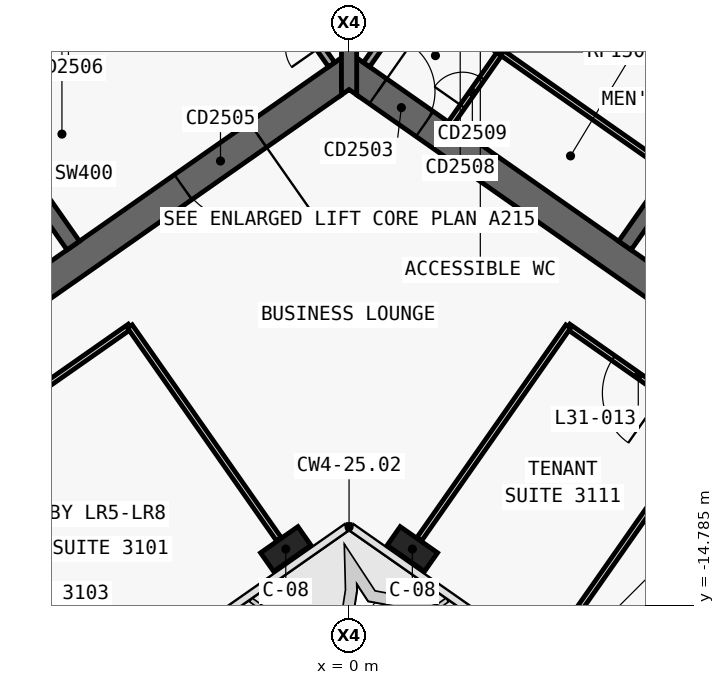
"""IFC4 building model, lengths in metres.
Left out: names, types, materials, properties, quantities, classifications, styles, units other than length and angle.
Written with IfcOpenShell. Run it as: python <this file> out.ifc"""

import sys

from ifc_helpers import new_model, si_unit, direction, frame, frame_2d, origin, origin_2d, place, context, subcontext, project, spatial, polyline, rectangle, outline, extrude, element, fill, save


model = new_model("IFC4")
c1 = context("Model", 3, precision=1e-05, world=origin(), true_north=direction((0.0, 1.0)))
c2 = subcontext(c1, "Body", "Model", "MODEL_VIEW")
j1 = project(units=[si_unit("LENGTHUNIT", "METRE"), si_unit("PLANEANGLEUNIT", "RADIAN")], contexts=[c1])
p1 = place(None, origin())
s1 = spatial("IfcSite", under=j1, at=p1, CompositionType="ELEMENT")
p2 = place(p1, origin())
s2 = spatial("IfcBuilding", under=s1, at=p2, CompositionType="ELEMENT")
p3 = place(p2, frame((0.0, 0.0, 139.8)))
s3 = spatial("IfcBuildingStorey", under=s2, at=p3, CompositionType="ELEMENT", Elevation=139.8)
p4 = place(p3, frame((0.029, 11.984, 0.0), z_axis=(0.0, 0.0, 1.0), x_axis=(-0.819151382952, -0.573577380837, 0.0)))
e1 = element("IfcWall", 1, at=p4, inside=s3, PredefinedType="SHEAR", context=c2, shape_type="SweptSolid", body=[
    extrude(outline(polyline([(33.898, 0.4), (0.56, 0.4), (-0.0, -0.4), (33.898, -0.4), (33.898, 0.4)])), origin(), (0.0, 0.0, 1.0), 3.9),
])
p5 = place(p3, frame((0.029, -0.712, 0.0), z_axis=(0.0, 0.0, 1.0), x_axis=(-0.819151758019, -0.573576845187, 0.0)))
e2 = element("IfcWall", 2, at=p5, inside=s3, PredefinedType="SHEAR", context=c2, shape_type="SweptSolid", body=[
    extrude(outline(polyline([(26.616, 0.4), (0.56, 0.4), (-0.0, -0.4), (26.616, -0.4), (26.616, 0.4)])), origin(), (0.0, 0.0, 1.0), 3.9),
])
p6 = place(p5, frame((2.966, 0.0, 0.0)))
e3 = element("IfcOpeningElement", 3, at=p6, cuts=e2, PredefinedType="OPENING", context=c2, shape_type="SweptSolid", body=[
    extrude(rectangle(XDim=2.4, YDim=2.1, at=frame_2d((1.2, 1.05))), frame((0.0, 0.41, 0.0), z_axis=(0.0, -1.0, 0.0), x_axis=(1.0, 0.0, 0.0)), (0.0, 0.0, 1.0), 0.82),
])
p7 = place(p5, frame((11.916, 0.0, 0.0)))
e4 = element("IfcOpeningElement", 4, at=p7, cuts=e2, PredefinedType="OPENING", context=c2, shape_type="SweptSolid", body=[
    extrude(rectangle(XDim=2.4, YDim=2.1, at=frame_2d((1.2, 1.05))), frame((0.0, 0.41, 0.0), z_axis=(0.0, -1.0, 0.0), x_axis=(1.0, 0.0, 0.0)), (0.0, 0.0, 1.0), 0.82),
])
p8 = place(p3, frame((-7.258, -5.326, 0.0), z_axis=(0.0, 0.0, 1.0), x_axis=(-0.573540709186, 0.819177059558, 0.0)))
e5 = element("IfcWall", 5, at=p8, inside=s3, PredefinedType="SHEAR", context=c2, shape_type="SweptSolid", body=[
    extrude(outline(polyline([(4.6, 0.2), (-0.0, 0.2), (-0.0, -0.2), (4.6, -0.2), (4.6, 0.2)])), origin(), (0.0, 0.0, 1.0), 3.9),
])
p9 = place(p3, frame((-2.638, 3.768, 0.0), z_axis=(0.0, 0.0, 1.0), x_axis=(-0.81915267502, -0.573575535572, 0.0)))
e6 = element("IfcWall", 6, at=p9, inside=s3, PredefinedType="SHEAR", context=c2, shape_type="SweptSolid", body=[
    extrude(outline(polyline([(26.2, 0.2), (0.0, 0.2), (0.0, -0.2), (26.2, -0.2), (26.2, 0.2)])), origin(), (0.0, 0.0, 1.0), 3.9),
])
p10 = place(p9, frame((1.169, 0.0, 0.0)))
e7 = element("IfcOpeningElement", 7, at=p10, cuts=e6, PredefinedType="OPENING", context=c2, shape_type="SweptSolid", body=[
    extrude(rectangle(XDim=1.1, YDim=2.1, at=frame_2d((0.55, 1.05))), frame((0.0, 0.21, 0.0), z_axis=(0.0, -1.0, 0.0), x_axis=(1.0, 0.0, 0.0)), (0.0, 0.0, 1.0), 0.42),
])
p11 = place(p9, frame((3.206, 0.0, 0.0)))
e8 = element("IfcOpeningElement", 8, at=p11, cuts=e6, PredefinedType="OPENING", context=c2, shape_type="SweptSolid", body=[
    extrude(rectangle(XDim=1.1, YDim=2.1, at=frame_2d((0.55, 1.05))), frame((0.0, 0.21, 0.0), z_axis=(0.0, -1.0, 0.0), x_axis=(1.0, 0.0, 0.0)), (0.0, 0.0, 1.0), 0.42),
])
p12 = place(p9, frame((5.244, 0.0, 0.0)))
e9 = element("IfcOpeningElement", 9, at=p12, cuts=e6, PredefinedType="OPENING", context=c2, shape_type="SweptSolid", body=[
    extrude(rectangle(XDim=1.1, YDim=2.1, at=frame_2d((0.55, 1.05))), frame((0.0, 0.21, 0.0), z_axis=(0.0, -1.0, 0.0), x_axis=(1.0, 0.0, 0.0)), (0.0, 0.0, 1.0), 0.42),
])
p13 = place(p9, frame((7.281, 0.0, 0.0)))
e10 = element("IfcOpeningElement", 10, at=p13, cuts=e6, PredefinedType="OPENING", context=c2, shape_type="SweptSolid", body=[
    extrude(rectangle(XDim=1.1, YDim=2.1, at=frame_2d((0.55, 1.05))), frame((0.0, 0.21, 0.0), z_axis=(0.0, -1.0, 0.0), x_axis=(1.0, 0.0, 0.0)), (0.0, 0.0, 1.0), 0.42),
])
p14 = place(p9, frame((9.688, 0.0, 0.0)))
e11 = element("IfcOpeningElement", 11, at=p14, cuts=e6, PredefinedType="OPENING", context=c2, shape_type="SweptSolid", body=[
    extrude(rectangle(XDim=1.1, YDim=2.1, at=frame_2d((0.55, 1.05))), frame((0.0, 0.21, 0.0), z_axis=(0.0, -1.0, 0.0), x_axis=(1.0, 0.0, 0.0)), (0.0, 0.0, 1.0), 0.42),
])
p15 = place(p9, frame((11.863, 0.0, 0.0)))
e12 = element("IfcOpeningElement", 12, at=p15, cuts=e6, PredefinedType="OPENING", context=c2, shape_type="SweptSolid", body=[
    extrude(rectangle(XDim=1.1, YDim=2.1, at=frame_2d((0.55, 1.05))), frame((0.0, 0.21, 0.0), z_axis=(0.0, -1.0, 0.0), x_axis=(1.0, 0.0, 0.0)), (0.0, 0.0, 1.0), 0.42),
])
p16 = place(p9, frame((14.038, 0.0, 0.0)))
e13 = element("IfcOpeningElement", 13, at=p16, cuts=e6, PredefinedType="OPENING", context=c2, shape_type="SweptSolid", body=[
    extrude(rectangle(XDim=1.1, YDim=2.1, at=frame_2d((0.55, 1.05))), frame((0.0, 0.21, 0.0), z_axis=(0.0, -1.0, 0.0), x_axis=(1.0, 0.0, 0.0)), (0.0, 0.0, 1.0), 0.42),
])
p17 = place(p9, frame((16.212, 0.0, 0.0)))
e14 = element("IfcOpeningElement", 14, at=p17, cuts=e6, PredefinedType="OPENING", context=c2, shape_type="SweptSolid", body=[
    extrude(rectangle(XDim=1.1, YDim=2.1, at=frame_2d((0.55, 1.05))), frame((0.0, 0.21, 0.0), z_axis=(0.0, -1.0, 0.0), x_axis=(1.0, 0.0, 0.0)), (0.0, 0.0, 1.0), 0.42),
])
p18 = place(p3, frame((-0.029, 11.984, 0.0), z_axis=(0.0, 0.0, 1.0), x_axis=(0.819151382952, -0.573577380837, 0.0)))
e15 = element("IfcWall", 15, at=p18, inside=s3, PredefinedType="SHEAR", context=c2, shape_type="SweptSolid", body=[
    extrude(outline(polyline([(33.898, 0.4), (-0.0, 0.4), (0.56, -0.4), (33.898, -0.4), (33.898, 0.4)])), origin(), (0.0, 0.0, 1.0), 3.9),
])
p19 = place(p3, frame((-0.029, -0.712, 0.0), z_axis=(0.0, 0.0, 1.0), x_axis=(0.819151758019, -0.573576845187, 0.0)))
e16 = element("IfcWall", 16, at=p19, inside=s3, PredefinedType="SHEAR", context=c2, shape_type="SweptSolid", body=[
    extrude(outline(polyline([(26.616, 0.4), (-0.0, 0.4), (0.56, -0.4), (26.616, -0.4), (26.616, 0.4)])), origin(), (0.0, 0.0, 1.0), 3.9),
])
p20 = place(p19, frame((0.966, 0.0, 0.0)))
e17 = element("IfcOpeningElement", 17, at=p20, cuts=e16, PredefinedType="OPENING", context=c2, shape_type="SweptSolid", body=[
    extrude(rectangle(XDim=1.5, YDim=2.1, at=frame_2d((0.75, 1.05))), frame((0.0, 0.41, 0.0), z_axis=(0.0, -1.0, 0.0), x_axis=(1.0, 0.0, 0.0)), (0.0, 0.0, 1.0), 0.82),
])
p21 = place(p19, frame((12.366, 0.0, 0.0)))
e18 = element("IfcOpeningElement", 18, at=p21, cuts=e16, PredefinedType="OPENING", context=c2, shape_type="SweptSolid", body=[
    extrude(rectangle(XDim=1.5, YDim=2.1, at=frame_2d((0.75, 1.05))), frame((0.0, 0.41, 0.0), z_axis=(0.0, -1.0, 0.0), x_axis=(1.0, 0.0, 0.0)), (0.0, 0.0, 1.0), 0.82),
])
p22 = place(p3, frame((7.258, -5.326, 0.0), z_axis=(0.0, 0.0, 1.0), x_axis=(0.573540709186, 0.819177059558, 0.0)))
e19 = element("IfcWall", 19, at=p22, inside=s3, PredefinedType="SHEAR", context=c2, shape_type="SweptSolid", body=[
    extrude(outline(polyline([(-0.0, 0.2), (-0.0, -0.2), (4.6, -0.2), (4.6, 0.2), (-0.0, 0.2)])), origin(), (0.0, 0.0, 1.0), 3.9),
])
p23 = place(p3, frame((2.638, 3.768, 0.0), z_axis=(0.0, 0.0, 1.0), x_axis=(0.81915267502, -0.573575535572, 0.0)))
e20 = element("IfcWall", 20, at=p23, inside=s3, PredefinedType="SHEAR", context=c2, shape_type="SweptSolid", body=[
    extrude(outline(polyline([(0.0, 0.2), (0.0, -0.2), (26.2, -0.2), (26.2, 0.2), (0.0, 0.2)])), origin(), (0.0, 0.0, 1.0), 3.9),
])
p24 = place(p23, frame((9.637, 0.0, 0.0)))
e21 = element("IfcOpeningElement", 21, at=p24, cuts=e20, PredefinedType="OPENING", context=c2, shape_type="SweptSolid", body=[
    extrude(rectangle(XDim=1.2, YDim=2.1, at=frame_2d((0.6, 1.05))), frame((0.0, 0.21, 0.0), z_axis=(0.0, -1.0, 0.0), x_axis=(1.0, 0.0, 0.0)), (0.0, 0.0, 1.0), 0.42),
])
p25 = place(p23, frame((11.812, 0.0, 0.0)))
e22 = element("IfcOpeningElement", 22, at=p25, cuts=e20, PredefinedType="OPENING", context=c2, shape_type="SweptSolid", body=[
    extrude(rectangle(XDim=1.2, YDim=2.1, at=frame_2d((0.6, 1.05))), frame((0.0, 0.21, 0.0), z_axis=(0.0, -1.0, 0.0), x_axis=(1.0, 0.0, 0.0)), (0.0, 0.0, 1.0), 0.42),
])
p26 = place(p23, frame((13.988, 0.0, 0.0)))
e23 = element("IfcOpeningElement", 23, at=p26, cuts=e20, PredefinedType="OPENING", context=c2, shape_type="SweptSolid", body=[
    extrude(rectangle(XDim=1.2, YDim=2.1, at=frame_2d((0.6, 1.05))), frame((0.0, 0.21, 0.0), z_axis=(0.0, -1.0, 0.0), x_axis=(1.0, 0.0, 0.0)), (0.0, 0.0, 1.0), 0.42),
])
p27 = place(p23, frame((16.262, 0.0, 0.0)))
e24 = element("IfcOpeningElement", 24, at=p27, cuts=e20, PredefinedType="OPENING", context=c2, shape_type="SweptSolid", body=[
    extrude(rectangle(XDim=1.0, YDim=2.1, at=frame_2d((0.5, 1.05))), frame((0.0, 0.21, 0.0), z_axis=(0.0, -1.0, 0.0), x_axis=(1.0, 0.0, 0.0)), (0.0, 0.0, 1.0), 0.42),
])
p28 = place(p3, frame((0.0, -1.361, 0.0), z_axis=(0.0, 0.0, 1.0), x_axis=(0.0, 1.0, 0.0)))
e25 = element("IfcWall", 25, at=p28, inside=s3, PredefinedType="SHEAR", context=c2, shape_type="SweptSolid", body=[
    extrude(outline(polyline([(0.0, -0.2), (0.14, -0.2), (1.075, -0.2), (12.696, -0.2), (13.813, -0.2), (13.893, -0.2), (13.933, -0.172), (13.813, 0.0), (13.933, 0.172), (13.893, 0.2), (13.813, 0.2), (12.696, 0.2), (1.075, 0.2), (0.14, 0.2), (0.0, 0.2), (0.14, 0.0), (0.0, -0.2)])), origin(), (0.0, 0.0, 1.0), 3.9),
])
for number, where, z_axis, x_axis in (
    (26, (-1.665, -13.313, 0.0), (0.0, 0.0, 1.0), (-0.819, -0.574, 0.0)),
    (27, (1.665, -13.313, 0.0), (0.0, 0.0, 1.0), (0.819, -0.574, 0.0)),
):
    element("IfcColumn", number, at=place(p3, frame(where, z_axis=z_axis, x_axis=x_axis)), inside=s3, PredefinedType="COLUMN", context=c2, shape_type="SweptSolid", body=[
        extrude(rectangle(XDim=1.2, YDim=0.6, at=origin_2d()), origin(), (0.0, 0.0, 1.0), 3.9),
    ])
p29 = place(p3, frame((2.67, -2.114, 0.0), z_axis=(0.0, 0.0, 1.0), x_axis=(0.573576324356, 0.819152122709, 0.0)))
e28 = element("IfcWall", 28, at=p29, inside=s3, PredefinedType="PARTITIONING", context=c2, shape_type="SweptSolid", body=[
    extrude(rectangle(XDim=4.6, YDim=0.15, at=frame_2d((2.3, 0.0))), origin(), (0.0, 0.0, 1.0), 3.62),
])
p30 = place(p29, frame((0.55, 0.0, 0.0)))
e29 = element("IfcOpeningElement", 29, at=p30, cuts=e28, PredefinedType="OPENING", context=c2, shape_type="SweptSolid", body=[
    extrude(rectangle(XDim=0.9, YDim=2.1, at=frame_2d((0.45, 1.05))), frame((0.0, 0.085, 0.0), z_axis=(0.0, -1.0, 0.0), x_axis=(1.0, 0.0, 0.0)), (0.0, 0.0, 1.0), 0.17),
])
p31 = place(p29, frame((2.95, 0.0, 0.0)))
e30 = element("IfcOpeningElement", 30, at=p31, cuts=e28, PredefinedType="OPENING", context=c2, shape_type="SweptSolid", body=[
    extrude(rectangle(XDim=0.9, YDim=2.1, at=frame_2d((0.45, 1.05))), frame((0.0, 0.085, 0.0), z_axis=(0.0, -1.0, 0.0), x_axis=(1.0, 0.0, 0.0)), (0.0, 0.0, 1.0), 0.17),
])
p32 = place(p3, frame((1.86, 1.261, 0.0), z_axis=(0.0, 0.0, 1.0), x_axis=(0.819103967032, -0.573645091666, 0.0)))
e31 = element("IfcWall", 31, at=p32, inside=s3, PredefinedType="PARTITIONING", context=c2, shape_type="SweptSolid", body=[
    extrude(rectangle(XDim=2.6, YDim=0.15, at=frame_2d((1.3, 0.0))), origin(), (0.0, 0.0, 1.0), 3.62),
])
p33 = place(p32, frame((0.85, 0.0, 0.0)))
e32 = element("IfcOpeningElement", 32, at=p33, cuts=e31, PredefinedType="OPENING", context=c2, shape_type="SweptSolid", body=[
    extrude(rectangle(XDim=0.9, YDim=2.1, at=frame_2d((0.45, 1.05))), frame((0.0, 0.085, 0.0), z_axis=(0.0, -1.0, 0.0), x_axis=(1.0, 0.0, 0.0)), (0.0, 0.0, 1.0), 0.17),
])
p34 = place(p3, frame((3.99, -0.23, 0.0), z_axis=(0.0, 0.0, 1.0), x_axis=(0.819153326956, -0.573574604508, 0.0)))
e33 = element("IfcWall", 33, at=p34, inside=s3, PredefinedType="PARTITIONING", context=c2, shape_type="SweptSolid", body=[
    extrude(rectangle(XDim=5.4, YDim=0.15, at=frame_2d((2.7, 0.0))), origin(), (0.0, 0.0, 1.0), 3.62),
])
p35 = place(p3, frame((-0.459, -0.565, 0.0), z_axis=(0.0, 0.0, 1.0), x_axis=(-0.573576324356, 0.819152122709, 0.0)))
e34 = element("IfcWall", 34, at=p35, inside=s3, PredefinedType="SOLIDWALL", context=c2, shape_type="SweptSolid", body=[
    extrude(rectangle(XDim=4.6, YDim=0.2, at=frame_2d((2.3, 0.0))), origin(), (0.0, 0.0, 1.0), 3.62),
])
p36 = place(p35, frame((0.55, 0.0, 0.0)))
e35 = element("IfcOpeningElement", 35, at=p36, cuts=e34, PredefinedType="OPENING", context=c2, shape_type="SweptSolid", body=[
    extrude(rectangle(XDim=0.9, YDim=2.1, at=frame_2d((0.45, 1.05))), frame((0.0, 0.11, 0.0), z_axis=(0.0, -1.0, 0.0), x_axis=(1.0, 0.0, 0.0)), (0.0, 0.0, 1.0), 0.22),
])
p37 = place(p3, frame((0.459, -0.565, 0.0), z_axis=(0.0, 0.0, 1.0), x_axis=(0.573576324356, 0.819152122709, 0.0)))
e36 = element("IfcWall", 36, at=p37, inside=s3, PredefinedType="SOLIDWALL", context=c2, shape_type="SweptSolid", body=[
    extrude(rectangle(XDim=4.6, YDim=0.2, at=frame_2d((2.3, 0.0))), origin(), (0.0, 0.0, 1.0), 3.62),
])
p38 = place(p37, frame((0.55, 0.0, 0.0)))
e37 = element("IfcOpeningElement", 37, at=p38, cuts=e36, PredefinedType="OPENING", context=c2, shape_type="SweptSolid", body=[
    extrude(rectangle(XDim=0.9, YDim=2.1, at=frame_2d((0.45, 1.05))), frame((0.0, 0.11, 0.0), z_axis=(0.0, -1.0, 0.0), x_axis=(1.0, 0.0, 0.0)), (0.0, 0.0, 1.0), 0.22),
])
p39 = place(p3, frame((9.454, -10.038, 0.0), z_axis=(0.0, 0.0, 1.0), x_axis=(-0.819142740634, 0.573589723117, 0.0)))
e38 = element("IfcWall", 38, at=p39, inside=s3, PredefinedType="PARTITIONING", context=c2, shape_type="SweptSolid", body=[
    extrude(rectangle(XDim=4.502, YDim=0.15, at=frame_2d((2.251, 0.0))), origin(), (0.0, 0.0, 1.0), 3.0),
])
p40 = place(p39, frame((1.451, 0.0, 0.0)))
e39 = element("IfcOpeningElement", 39, at=p40, cuts=e38, PredefinedType="OPENING", context=c2, shape_type="SweptSolid", body=[
    extrude(rectangle(XDim=1.6, YDim=2.1, at=frame_2d((0.8, 1.05))), frame((0.0, 0.085, 0.0), z_axis=(0.0, -1.0, 0.0), x_axis=(1.0, 0.0, 0.0)), (0.0, 0.0, 1.0), 0.17),
])
p41 = place(p3, frame((-5.766, -7.456, 0.0), z_axis=(0.0, 0.0, 1.0), x_axis=(-0.81915291695, -0.57357519006, 0.0)))
e40 = element("IfcWall", 40, at=p41, inside=s3, PredefinedType="PARTITIONING", context=c2, shape_type="SweptSolid", body=[
    extrude(rectangle(XDim=9.002, YDim=0.15, at=frame_2d((4.501, 0.0))), origin(), (0.0, 0.0, 1.0), 3.0),
])
p42 = place(p41, frame((3.701, 0.0, 0.0)))
e41 = element("IfcOpeningElement", 41, at=p42, cuts=e40, PredefinedType="OPENING", context=c2, shape_type="SweptSolid", body=[
    extrude(rectangle(XDim=1.6, YDim=2.1, at=frame_2d((0.8, 1.05))), frame((0.0, 0.085, 0.0), z_axis=(0.0, -1.0, 0.0), x_axis=(1.0, 0.0, 0.0)), (0.0, 0.0, 1.0), 0.17),
])
p43 = place(p3, frame((9.452, -10.037, 0.0), z_axis=(0.0, 0.0, 1.0), x_axis=(-0.573575945067, -0.81915238829, 0.0)))
e42 = element("IfcWall", 42, at=p43, inside=s3, PredefinedType="PARTITIONING", context=c2, shape_type="SweptSolid", body=[
    extrude(rectangle(XDim=7.5, YDim=0.15, at=frame_2d((3.75, 0.0))), origin(), (0.0, 0.0, 1.0), 2.9),
])
p44 = place(p3, frame((1.849, -13.051, 0.0), z_axis=(0.0, 0.0, 1.0), x_axis=(0.573577493031, 0.819151304393, 0.0)))
e43 = element("IfcWall", 43, at=p44, inside=s3, PredefinedType="PARTITIONING", context=c2, shape_type="SweptSolid", body=[
    extrude(rectangle(XDim=6.83, YDim=0.15, at=frame_2d((3.415, 0.0))), origin(), (0.0, 0.0, 1.0), 3.0),
])
p45 = place(p3, frame((-1.849, -13.051, 0.0), z_axis=(0.0, 0.0, 1.0), x_axis=(-0.57357985571, 0.819149650018, 0.0)))
e44 = element("IfcWall", 44, at=p45, inside=s3, PredefinedType="PARTITIONING", context=c2, shape_type="SweptSolid", body=[
    extrude(rectangle(XDim=6.832, YDim=0.15, at=frame_2d((3.416, 0.0))), origin(), (0.0, 0.0, 1.0), 3.0),
])
p46 = place(p6, origin())
e45 = element("IfcDoor", 45, at=p46, inside=s3, OperationType="DOUBLE_DOOR_SINGLE_SWING", PredefinedType="DOOR", context=c2, shape_type="SweptSolid", body=[
    extrude(rectangle(XDim=2.4, YDim=2.1, at=frame_2d((1.2, 1.05))), frame((0.0, 0.025, 0.0), z_axis=(0.0, -1.0, 0.0), x_axis=(1.0, 0.0, 0.0)), (0.0, 0.0, 1.0), 0.05),
])
fill(e3, e45)
p47 = place(p30, origin())
e46 = element("IfcDoor", 46, at=p47, inside=s3, OperationType="SINGLE_SWING_RIGHT", PredefinedType="DOOR", context=c2, shape_type="SweptSolid", body=[
    extrude(rectangle(XDim=0.9, YDim=2.1, at=frame_2d((0.45, 1.05))), frame((0.0, 0.025, 0.0), z_axis=(0.0, -1.0, 0.0), x_axis=(1.0, 0.0, 0.0)), (0.0, 0.0, 1.0), 0.05),
])
fill(e29, e46)
p48 = place(p20, origin())
e47 = element("IfcDoor", 47, at=p48, inside=s3, OperationType="SINGLE_SWING_RIGHT", PredefinedType="DOOR", context=c2, shape_type="SweptSolid", body=[
    extrude(rectangle(XDim=1.5, YDim=2.1, at=frame_2d((0.75, 1.05))), frame((0.0, 0.025, 0.0), z_axis=(0.0, -1.0, 0.0), x_axis=(1.0, 0.0, 0.0)), (0.0, 0.0, 1.0), 0.05),
])
fill(e17, e47)
p49 = place(p40, origin())
e48 = element("IfcDoor", 48, at=p49, inside=s3, OperationType="DOUBLE_DOOR_SINGLE_SWING", PredefinedType="DOOR", context=c2, shape_type="SweptSolid", body=[
    extrude(rectangle(XDim=1.6, YDim=2.1, at=frame_2d((0.8, 1.05))), frame((0.0, 0.025, 0.0), z_axis=(0.0, -1.0, 0.0), x_axis=(1.0, 0.0, 0.0)), (0.0, 0.0, 1.0), 0.05),
])
fill(e39, e48)
save(model, sys.argv[1])
